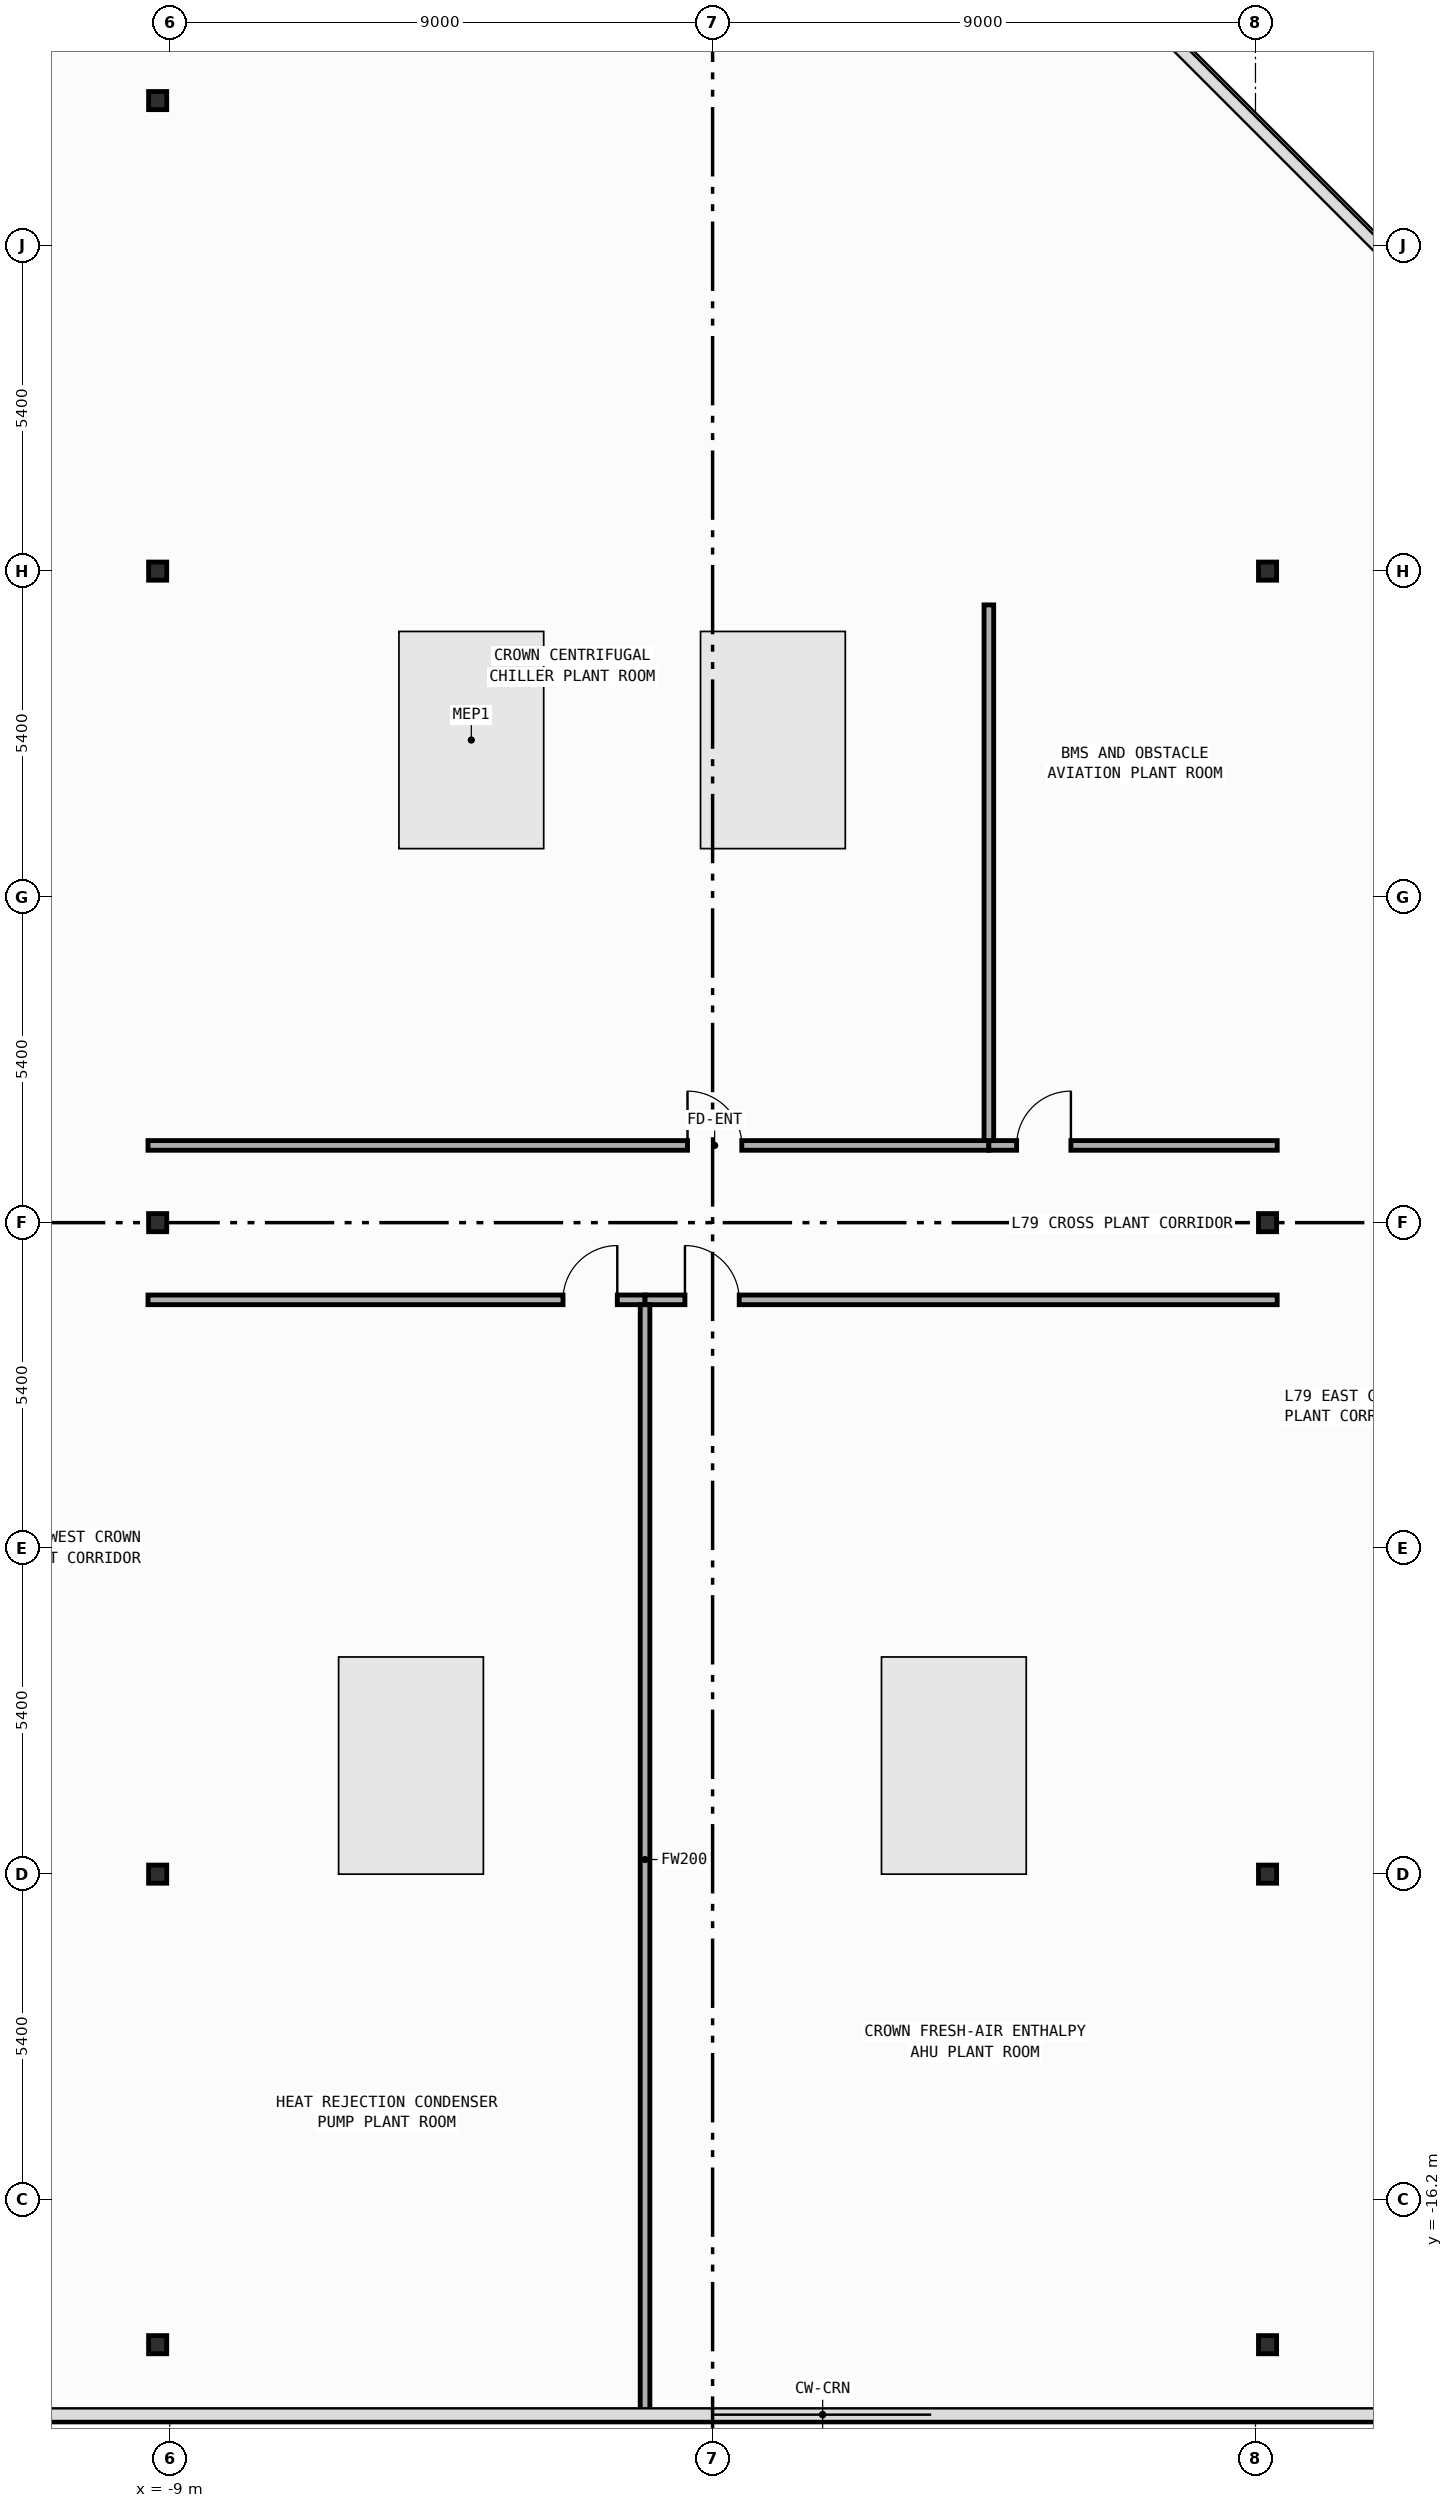
"""IFC4 building model, lengths in metres.
Left out: names, types, materials, properties, quantities, classifications, styles, units other than length and angle.
Written with IfcOpenShell. Run it as: python <this file> out.ifc"""

import sys

from ifc_helpers import new_model, si_unit, direction, frame, frame_2d, origin, origin_2d, place, context, subcontext, project, spatial, rectangle, i_section, extrude, element, fill, save


model = new_model("IFC4")
c1 = context("Model", 3, precision=1e-05, world=origin(), true_north=direction((0.0, 1.0)))
c2 = subcontext(c1, "Body", "Model", "MODEL_VIEW")
j1 = project(units=[si_unit("LENGTHUNIT", "METRE"), si_unit("PLANEANGLEUNIT", "RADIAN")], contexts=[c1])
p1 = place(None, origin())
s1 = spatial("IfcSite", under=j1, at=p1, CompositionType="ELEMENT")
p2 = place(p1, origin())
s2 = spatial("IfcBuilding", under=s1, at=p2, CompositionType="ELEMENT")
p3 = place(p2, frame((0.0, 0.0, 330.4)))
s3 = spatial("IfcBuildingStorey", under=s2, at=p3, CompositionType="ELEMENT", Elevation=330.4)
for number, where, z_axis, x_axis in (
    (1, (-9.2, -18.6, 0.0), (0.0, 0.0, 1.0), (1.0, 0.0, 0.0)),
    (2, (-9.2, -10.8, 0.0), (0.0, 0.0, 1.0), (1.0, 0.0, 0.0)),
    (3, (-9.2, 0.0, 0.0), (0.0, 0.0, 1.0), (1.0, 0.0, 0.0)),
    (4, (-9.2, 10.8, 0.0), (0.0, 0.0, 1.0), (1.0, 0.0, 0.0)),
    (5, (-9.2, 18.6, 0.0), (0.0, 0.0, 1.0), (1.0, 0.0, 0.0)),
    (6, (9.2, -18.6, 0.0), (0.0, 0.0, 1.0), (1.0, 0.0, 0.0)),
    (7, (9.2, -10.8, 0.0), (0.0, 0.0, 1.0), (1.0, 0.0, 0.0)),
    (8, (9.2, 0.0, 0.0), (0.0, 0.0, 1.0), (1.0, 0.0, 0.0)),
    (9, (9.2, 10.8, 0.0), (0.0, 0.0, 1.0), (1.0, 0.0, 0.0)),
):
    element("IfcColumn", number, at=place(p3, frame(where, z_axis=z_axis, x_axis=x_axis)), inside=s3, PredefinedType="COLUMN", context=c2, shape_type="SweptSolid", body=[
        extrude(i_section(OverallWidth=0.3, OverallDepth=0.3, WebThickness=0.01, FlangeThickness=0.015, FilletRadius=0.018, at=origin_2d()), origin(), (0.0, 0.0, 1.0), 4.6),
    ])
p4 = place(p3, frame((-9.36, 1.28, 0.0), z_axis=(0.0, 0.0, 1.0), x_axis=(1.0, 0.0, 0.0)))
e10 = element("IfcWall", 10, at=p4, inside=s3, PredefinedType="PARTITIONING", context=c2, shape_type="SweptSolid", body=[
    extrude(rectangle(XDim=13.94, YDim=0.16, at=frame_2d((6.97, 0.0))), origin(), (0.0, 0.0, 1.0), 4.34),
])
p5 = place(p4, frame((8.944, 0.0, 0.0)))
e11 = element("IfcOpeningElement", 11, at=p5, cuts=e10, PredefinedType="OPENING", context=c2, shape_type="SweptSolid", body=[
    extrude(rectangle(XDim=0.9, YDim=2.15, at=frame_2d((0.45, 1.075))), frame((0.0, 0.09, 0.0), z_axis=(0.0, -1.0, 0.0), x_axis=(1.0, 0.0, 0.0)), (0.0, 0.0, 1.0), 0.18),
])
p6 = place(p3, frame((-9.36, -1.28, 0.0), z_axis=(0.0, 0.0, 1.0), x_axis=(1.0, 0.0, 0.0)))
e12 = element("IfcWall", 12, at=p6, inside=s3, PredefinedType="PARTITIONING", context=c2, shape_type="SweptSolid", body=[
    extrude(rectangle(XDim=8.24, YDim=0.16, at=frame_2d((4.12, 0.0))), origin(), (0.0, 0.0, 1.0), 4.34),
])
p7 = place(p6, frame((6.88, 0.0, 0.0)))
e13 = element("IfcOpeningElement", 13, at=p7, cuts=e12, PredefinedType="OPENING", context=c2, shape_type="SweptSolid", body=[
    extrude(rectangle(XDim=0.9, YDim=2.15, at=frame_2d((0.45, 1.075))), frame((0.0, 0.09, 0.0), z_axis=(0.0, -1.0, 0.0), x_axis=(1.0, 0.0, 0.0)), (0.0, 0.0, 1.0), 0.18),
])
p8 = place(p3, frame((-1.12, -1.28, 0.0), z_axis=(0.0, 0.0, 1.0), x_axis=(1.0, 0.0, 0.0)))
e14 = element("IfcWall", 14, at=p8, inside=s3, PredefinedType="PARTITIONING", context=c2, shape_type="SweptSolid", body=[
    extrude(rectangle(XDim=10.48, YDim=0.16, at=frame_2d((5.24, 0.0))), origin(), (0.0, 0.0, 1.0), 4.34),
])
p9 = place(p8, frame((0.661, 0.0, 0.0)))
e15 = element("IfcOpeningElement", 15, at=p9, cuts=e14, PredefinedType="OPENING", context=c2, shape_type="SweptSolid", body=[
    extrude(rectangle(XDim=0.9, YDim=2.15, at=frame_2d((0.45, 1.075))), frame((0.0, 0.09, 0.0), z_axis=(0.0, -1.0, 0.0), x_axis=(1.0, 0.0, 0.0)), (0.0, 0.0, 1.0), 0.18),
])
p10 = place(p3, frame((4.58, 1.28, 0.0), z_axis=(0.0, 0.0, 1.0), x_axis=(1.0, 0.0, 0.0)))
e16 = element("IfcWall", 16, at=p10, inside=s3, PredefinedType="PARTITIONING", context=c2, shape_type="SweptSolid", body=[
    extrude(rectangle(XDim=4.78, YDim=0.16, at=frame_2d((2.39, 0.0))), origin(), (0.0, 0.0, 1.0), 4.34),
])
p11 = place(p10, frame((0.46, 0.0, 0.0)))
e17 = element("IfcOpeningElement", 17, at=p11, cuts=e16, PredefinedType="OPENING", context=c2, shape_type="SweptSolid", body=[
    extrude(rectangle(XDim=0.9, YDim=2.15, at=frame_2d((0.45, 1.075))), frame((0.0, 0.09, 0.0), z_axis=(0.0, -1.0, 0.0), x_axis=(1.0, 0.0, 0.0)), (0.0, 0.0, 1.0), 0.18),
])
p12 = place(p3, frame((4.58, 1.36, 0.0), z_axis=(0.0, 0.0, 1.0), x_axis=(0.0, 1.0, 0.0)))
e18 = element("IfcWall", 18, at=p12, inside=s3, PredefinedType="PARTITIONING", context=c2, shape_type="SweptSolid", body=[
    extrude(rectangle(XDim=8.88, YDim=0.16, at=frame_2d((4.44, 0.0))), origin(), (0.0, 0.0, 1.0), 3.99),
])
p13 = place(p3, frame((-1.12, -19.755, 0.0), z_axis=(0.0, 0.0, 1.0), x_axis=(0.0, 1.0, 0.0)))
e19 = element("IfcWall", 19, at=p13, inside=s3, PredefinedType="PARTITIONING", context=c2, shape_type="SweptSolid", body=[
    extrude(rectangle(XDim=18.395, YDim=0.16, at=frame_2d((9.197, 0.0))), origin(), (0.0, 0.0, 1.0), 4.34),
])
p14 = place(p5, origin())
e20 = element("IfcDoor", 20, at=p14, inside=s3, OperationType="SINGLE_SWING_LEFT", PredefinedType="DOOR", context=c2, shape_type="SweptSolid", body=[
    extrude(rectangle(XDim=0.9, YDim=2.15, at=frame_2d((0.45, 1.075))), frame((0.0, 0.025, 0.0), z_axis=(0.0, -1.0, 0.0), x_axis=(1.0, 0.0, 0.0)), (0.0, 0.0, 1.0), 0.05),
])
fill(e11, e20)
p15 = place(p7, origin())
e21 = element("IfcDoor", 21, at=p15, inside=s3, OperationType="SINGLE_SWING_RIGHT", PredefinedType="DOOR", context=c2, shape_type="SweptSolid", body=[
    extrude(rectangle(XDim=0.9, YDim=2.15, at=frame_2d((0.45, 1.075))), frame((0.0, 0.025, 0.0), z_axis=(0.0, -1.0, 0.0), x_axis=(1.0, 0.0, 0.0)), (0.0, 0.0, 1.0), 0.05),
])
fill(e13, e21)
p16 = place(p9, origin())
e22 = element("IfcDoor", 22, at=p16, inside=s3, OperationType="SINGLE_SWING_LEFT", PredefinedType="DOOR", context=c2, shape_type="SweptSolid", body=[
    extrude(rectangle(XDim=0.9, YDim=2.15, at=frame_2d((0.45, 1.075))), frame((0.0, 0.025, 0.0), z_axis=(0.0, -1.0, 0.0), x_axis=(1.0, 0.0, 0.0)), (0.0, 0.0, 1.0), 0.05),
])
fill(e15, e22)
p17 = place(p11, origin())
e23 = element("IfcDoor", 23, at=p17, inside=s3, OperationType="SINGLE_SWING_RIGHT", PredefinedType="DOOR", context=c2, shape_type="SweptSolid", body=[
    extrude(rectangle(XDim=0.9, YDim=2.15, at=frame_2d((0.45, 1.075))), frame((0.0, 0.025, 0.0), z_axis=(0.0, -1.0, 0.0), x_axis=(1.0, 0.0, 0.0)), (0.0, 0.0, 1.0), 0.05),
])
fill(e17, e23)
save(model, sys.argv[1])
